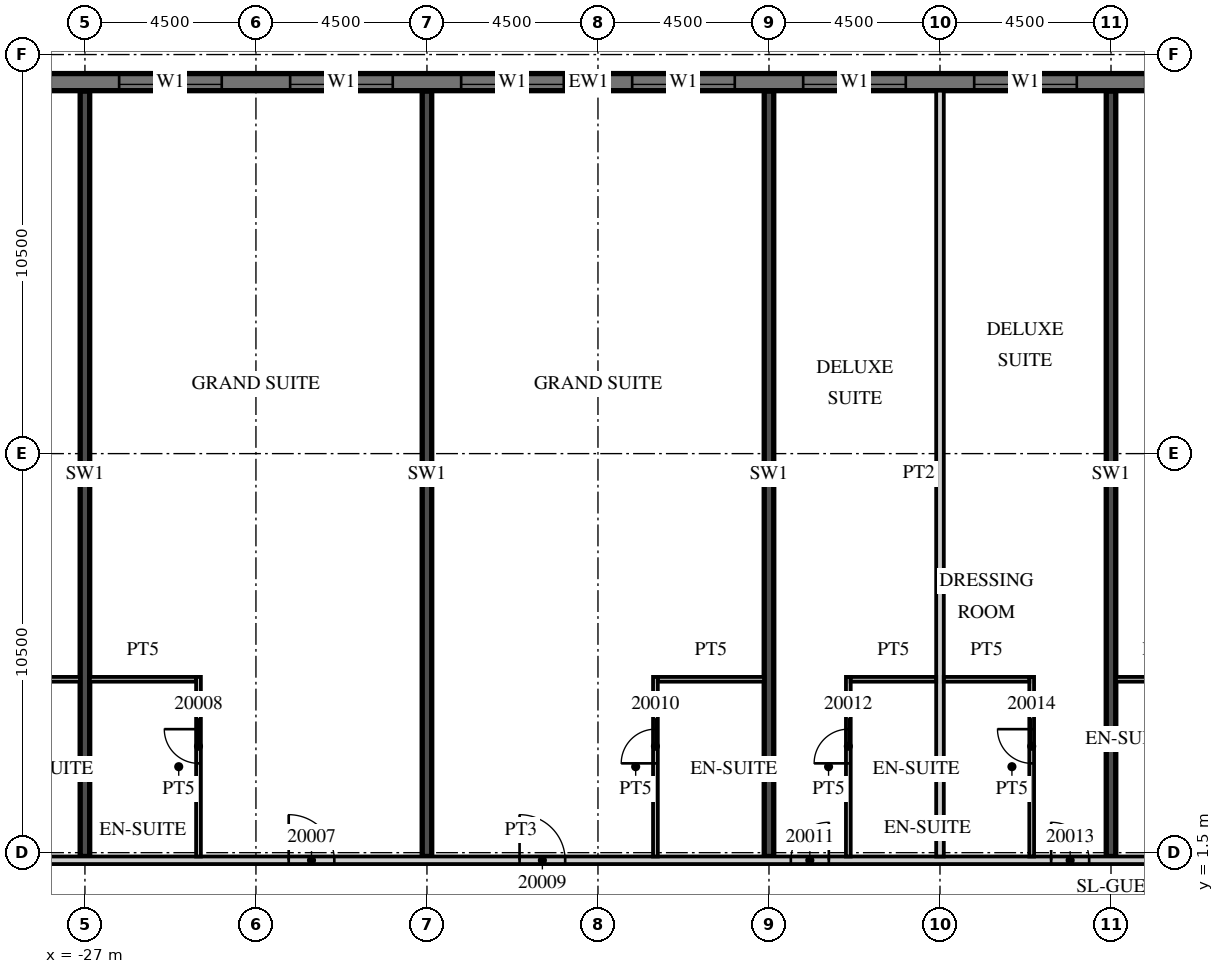
"""IFC4 building model, lengths in metres.
Left out: names, types, materials, properties, quantities, classifications, styles, units other than length and angle.
Written with IfcOpenShell. Run it as: python <this file> out.ifc"""

import sys

from ifc_helpers import new_model, si_unit, direction, frame, frame_2d, origin, place, context, subcontext, project, spatial, rectangle, extrude, element, fill, save


model = new_model("IFC4")
c1 = context("Model", 3, precision=1e-05, world=origin(), true_north=direction((0.0, 1.0)))
c2 = subcontext(c1, "Body", "Model", "MODEL_VIEW")
j1 = project(units=[si_unit("LENGTHUNIT", "METRE"), si_unit("PLANEANGLEUNIT", "RADIAN")], contexts=[c1])
p1 = place(None, origin())
s1 = spatial("IfcSite", under=j1, at=p1, CompositionType="ELEMENT")
p2 = place(p1, origin())
s2 = spatial("IfcBuilding", under=s1, at=p2, CompositionType="ELEMENT")
p3 = place(p2, frame((0.0, 0.0, 96.3)))
s3 = spatial("IfcBuildingStorey", under=s2, at=p3, CompositionType="ELEMENT", Elevation=96.3)
for number, where, z_axis, x_axis in (
    (1, (-27.0, 1.4, 0.0), (0.0, 0.0, 1.0), (0.0, 1.0, 0.0)),
    (2, (-18.0, 1.4, 0.0), (0.0, 0.0, 1.0), (0.0, 1.0, 0.0)),
    (3, (-9.0, 1.4, 0.0), (0.0, 0.0, 1.0), (0.0, 1.0, 0.0)),
    (4, (0.0, 1.4, 0.0), (0.0, 0.0, 1.0), (0.0, 1.0, 0.0)),
):
    element("IfcWall", number, at=place(p3, frame(where, z_axis=z_axis, x_axis=x_axis)), inside=s3, PredefinedType="SHEAR", context=c2, shape_type="SweptSolid", body=[
        extrude(rectangle(XDim=20.14, YDim=0.25, at=frame_2d((10.07, 0.0))), origin(), (0.0, 0.0, 1.0), 3.0),
    ])
p4 = place(p3, frame((13.5, 21.775, 0.0), z_axis=(0.0, 0.0, 1.0), x_axis=(-1.0, 0.0, 0.0)))
e5 = element("IfcWall", 5, at=p4, inside=s3, PredefinedType="SOLIDWALL", context=c2, shape_type="SweptSolid", body=[
    extrude(rectangle(XDim=54.5, YDim=0.45, at=frame_2d((27.25, 0.0))), origin(), (0.0, 0.0, 1.0), 3.0),
])
p5 = place(p4, frame((0.9, 0.0, 0.45)))
e6 = element("IfcOpeningElement", 6, at=p5, cuts=e5, PredefinedType="OPENING", context=c2, shape_type="SweptSolid", body=[
    extrude(rectangle(XDim=2.7, YDim=2.25, at=frame_2d((1.35, 1.125))), frame((0.0, 0.235, 0.0), z_axis=(0.0, -1.0, 0.0), x_axis=(1.0, 0.0, 0.0)), (0.0, 0.0, 1.0), 0.47),
])
p6 = place(p4, frame((5.4, 0.0, 0.45)))
e7 = element("IfcOpeningElement", 7, at=p6, cuts=e5, PredefinedType="OPENING", context=c2, shape_type="SweptSolid", body=[
    extrude(rectangle(XDim=2.7, YDim=2.25, at=frame_2d((1.35, 1.125))), frame((0.0, 0.235, 0.0), z_axis=(0.0, -1.0, 0.0), x_axis=(1.0, 0.0, 0.0)), (0.0, 0.0, 1.0), 0.47),
])
p7 = place(p4, frame((9.9, 0.0, 0.45)))
e8 = element("IfcOpeningElement", 8, at=p7, cuts=e5, PredefinedType="OPENING", context=c2, shape_type="SweptSolid", body=[
    extrude(rectangle(XDim=2.7, YDim=2.25, at=frame_2d((1.35, 1.125))), frame((0.0, 0.235, 0.0), z_axis=(0.0, -1.0, 0.0), x_axis=(1.0, 0.0, 0.0)), (0.0, 0.0, 1.0), 0.47),
])
p8 = place(p4, frame((14.4, 0.0, 0.45)))
e9 = element("IfcOpeningElement", 9, at=p8, cuts=e5, PredefinedType="OPENING", context=c2, shape_type="SweptSolid", body=[
    extrude(rectangle(XDim=2.7, YDim=2.25, at=frame_2d((1.35, 1.125))), frame((0.0, 0.235, 0.0), z_axis=(0.0, -1.0, 0.0), x_axis=(1.0, 0.0, 0.0)), (0.0, 0.0, 1.0), 0.47),
])
p9 = place(p4, frame((18.9, 0.0, 0.45)))
e10 = element("IfcOpeningElement", 10, at=p9, cuts=e5, PredefinedType="OPENING", context=c2, shape_type="SweptSolid", body=[
    extrude(rectangle(XDim=2.7, YDim=2.25, at=frame_2d((1.35, 1.125))), frame((0.0, 0.235, 0.0), z_axis=(0.0, -1.0, 0.0), x_axis=(1.0, 0.0, 0.0)), (0.0, 0.0, 1.0), 0.47),
])
p10 = place(p4, frame((23.4, 0.0, 0.45)))
e11 = element("IfcOpeningElement", 11, at=p10, cuts=e5, PredefinedType="OPENING", context=c2, shape_type="SweptSolid", body=[
    extrude(rectangle(XDim=2.7, YDim=2.25, at=frame_2d((1.35, 1.125))), frame((0.0, 0.235, 0.0), z_axis=(0.0, -1.0, 0.0), x_axis=(1.0, 0.0, 0.0)), (0.0, 0.0, 1.0), 0.47),
])
p11 = place(p4, frame((27.9, 0.0, 0.45)))
e12 = element("IfcOpeningElement", 12, at=p11, cuts=e5, PredefinedType="OPENING", context=c2, shape_type="SweptSolid", body=[
    extrude(rectangle(XDim=2.7, YDim=2.25, at=frame_2d((1.35, 1.125))), frame((0.0, 0.235, 0.0), z_axis=(0.0, -1.0, 0.0), x_axis=(1.0, 0.0, 0.0)), (0.0, 0.0, 1.0), 0.47),
])
p12 = place(p4, frame((32.4, 0.0, 0.45)))
e13 = element("IfcOpeningElement", 13, at=p12, cuts=e5, PredefinedType="OPENING", context=c2, shape_type="SweptSolid", body=[
    extrude(rectangle(XDim=2.7, YDim=2.25, at=frame_2d((1.35, 1.125))), frame((0.0, 0.235, 0.0), z_axis=(0.0, -1.0, 0.0), x_axis=(1.0, 0.0, 0.0)), (0.0, 0.0, 1.0), 0.47),
])
p13 = place(p4, frame((36.9, 0.0, 0.45)))
e14 = element("IfcOpeningElement", 14, at=p13, cuts=e5, PredefinedType="OPENING", context=c2, shape_type="SweptSolid", body=[
    extrude(rectangle(XDim=2.7, YDim=2.25, at=frame_2d((1.35, 1.125))), frame((0.0, 0.235, 0.0), z_axis=(0.0, -1.0, 0.0), x_axis=(1.0, 0.0, 0.0)), (0.0, 0.0, 1.0), 0.47),
])
p14 = place(p4, frame((41.4, 0.0, 0.45)))
e15 = element("IfcOpeningElement", 15, at=p14, cuts=e5, PredefinedType="OPENING", context=c2, shape_type="SweptSolid", body=[
    extrude(rectangle(XDim=2.7, YDim=2.25, at=frame_2d((1.35, 1.125))), frame((0.0, 0.235, 0.0), z_axis=(0.0, -1.0, 0.0), x_axis=(1.0, 0.0, 0.0)), (0.0, 0.0, 1.0), 0.47),
])
p15 = place(p4, frame((45.9, 0.0, 0.45)))
e16 = element("IfcOpeningElement", 16, at=p15, cuts=e5, PredefinedType="OPENING", context=c2, shape_type="SweptSolid", body=[
    extrude(rectangle(XDim=2.7, YDim=2.25, at=frame_2d((1.35, 1.125))), frame((0.0, 0.235, 0.0), z_axis=(0.0, -1.0, 0.0), x_axis=(1.0, 0.0, 0.0)), (0.0, 0.0, 1.0), 0.47),
])
p16 = place(p4, frame((50.4, 0.0, 0.45)))
e17 = element("IfcOpeningElement", 17, at=p16, cuts=e5, PredefinedType="OPENING", context=c2, shape_type="SweptSolid", body=[
    extrude(rectangle(XDim=2.7, YDim=2.25, at=frame_2d((1.35, 1.125))), frame((0.0, 0.235, 0.0), z_axis=(0.0, -1.0, 0.0), x_axis=(1.0, 0.0, 0.0)), (0.0, 0.0, 1.0), 0.47),
])
p17 = place(p3, frame((-44.55, 1.3, 0.0), z_axis=(0.0, 0.0, 1.0), x_axis=(1.0, 0.0, 0.0)))
e18 = element("IfcWall", 18, at=p17, inside=s3, PredefinedType="PARTITIONING", context=c2, shape_type="SweptSolid", body=[
    extrude(rectangle(XDim=58.05, YDim=0.2, at=frame_2d((29.025, 0.0))), origin(), (0.0, 0.0, 1.0), 3.0),
])
p18 = place(p17, frame((0.525, 0.0, 0.0)))
e19 = element("IfcOpeningElement", 19, at=p18, cuts=e18, PredefinedType="OPENING", context=c2, shape_type="SweptSolid", body=[
    extrude(rectangle(XDim=1.0, YDim=2.1, at=frame_2d((0.5, 1.05))), frame((0.0, 0.11, 0.0), z_axis=(0.0, -1.0, 0.0), x_axis=(1.0, 0.0, 0.0)), (0.0, 0.0, 1.0), 0.22),
])
p19 = place(p17, frame((4.625, 0.0, 0.0)))
e20 = element("IfcOpeningElement", 20, at=p19, cuts=e18, PredefinedType="OPENING", context=c2, shape_type="SweptSolid", body=[
    extrude(rectangle(XDim=1.0, YDim=2.1, at=frame_2d((0.5, 1.05))), frame((0.0, 0.11, 0.0), z_axis=(0.0, -1.0, 0.0), x_axis=(1.0, 0.0, 0.0)), (0.0, 0.0, 1.0), 0.22),
])
p20 = place(p17, frame((10.987, 0.0, 0.0)))
e21 = element("IfcOpeningElement", 21, at=p20, cuts=e18, PredefinedType="OPENING", context=c2, shape_type="SweptSolid", body=[
    extrude(rectangle(XDim=1.2, YDim=2.1, at=frame_2d((0.6, 1.05))), frame((0.0, 0.11, 0.0), z_axis=(0.0, -1.0, 0.0), x_axis=(1.0, 0.0, 0.0)), (0.0, 0.0, 1.0), 0.22),
])
p21 = place(p17, frame((22.912, 0.0, 0.0)))
e22 = element("IfcOpeningElement", 22, at=p21, cuts=e18, PredefinedType="OPENING", context=c2, shape_type="SweptSolid", body=[
    extrude(rectangle(XDim=1.2, YDim=2.1, at=frame_2d((0.6, 1.05))), frame((0.0, 0.11, 0.0), z_axis=(0.0, -1.0, 0.0), x_axis=(1.0, 0.0, 0.0)), (0.0, 0.0, 1.0), 0.22),
])
p22 = place(p17, frame((28.987, 0.0, 0.0)))
e23 = element("IfcOpeningElement", 23, at=p22, cuts=e18, PredefinedType="OPENING", context=c2, shape_type="SweptSolid", body=[
    extrude(rectangle(XDim=1.2, YDim=2.1, at=frame_2d((0.6, 1.05))), frame((0.0, 0.11, 0.0), z_axis=(0.0, -1.0, 0.0), x_axis=(1.0, 0.0, 0.0)), (0.0, 0.0, 1.0), 0.22),
])
p23 = place(p17, frame((36.125, 0.0, 0.0)))
e24 = element("IfcOpeningElement", 24, at=p23, cuts=e18, PredefinedType="OPENING", context=c2, shape_type="SweptSolid", body=[
    extrude(rectangle(XDim=1.0, YDim=2.1, at=frame_2d((0.5, 1.05))), frame((0.0, 0.11, 0.0), z_axis=(0.0, -1.0, 0.0), x_axis=(1.0, 0.0, 0.0)), (0.0, 0.0, 1.0), 0.22),
])
p24 = place(p17, frame((42.975, 0.0, 0.0)))
e25 = element("IfcOpeningElement", 25, at=p24, cuts=e18, PredefinedType="OPENING", context=c2, shape_type="SweptSolid", body=[
    extrude(rectangle(XDim=1.0, YDim=2.1, at=frame_2d((0.5, 1.05))), frame((0.0, 0.11, 0.0), z_axis=(0.0, -1.0, 0.0), x_axis=(1.0, 0.0, 0.0)), (0.0, 0.0, 1.0), 0.22),
])
p25 = place(p17, frame((47.5, 0.0, 0.0)))
e26 = element("IfcOpeningElement", 26, at=p25, cuts=e18, PredefinedType="OPENING", context=c2, shape_type="SweptSolid", body=[
    extrude(rectangle(XDim=1.0, YDim=2.1, at=frame_2d((0.5, 1.05))), frame((0.0, 0.11, 0.0), z_axis=(0.0, -1.0, 0.0), x_axis=(1.0, 0.0, 0.0)), (0.0, 0.0, 1.0), 0.22),
])
p26 = place(p17, frame((49.6, 0.0, 0.0)))
e27 = element("IfcOpeningElement", 27, at=p26, cuts=e18, PredefinedType="OPENING", context=c2, shape_type="SweptSolid", body=[
    extrude(rectangle(XDim=1.0, YDim=2.1, at=frame_2d((0.5, 1.05))), frame((0.0, 0.11, 0.0), z_axis=(0.0, -1.0, 0.0), x_axis=(1.0, 0.0, 0.0)), (0.0, 0.0, 1.0), 0.22),
])
p27 = place(p17, frame((56.475, 0.0, 0.0)))
e28 = element("IfcOpeningElement", 28, at=p27, cuts=e18, PredefinedType="OPENING", context=c2, shape_type="SweptSolid", body=[
    extrude(rectangle(XDim=1.0, YDim=2.1, at=frame_2d((0.5, 1.05))), frame((0.0, 0.11, 0.0), z_axis=(0.0, -1.0, 0.0), x_axis=(1.0, 0.0, 0.0)), (0.0, 0.0, 1.0), 0.22),
])
p28 = place(p3, frame((-29.925, 6.062, 0.0), z_axis=(0.0, 0.0, 1.0), x_axis=(1.0, 0.0, 0.0)))
e29 = element("IfcWall", 29, at=p28, inside=s3, PredefinedType="PARTITIONING", context=c2, shape_type="SweptSolid", body=[
    extrude(rectangle(XDim=2.8, YDim=0.125, at=frame_2d((1.4, 0.0))), origin(), (0.0, 0.0, 1.0), 3.0),
])
p29 = place(p3, frame((-24.012, 1.4, 0.0), z_axis=(0.0, 0.0, 1.0), x_axis=(0.0, 1.0, 0.0)))
e30 = element("IfcWall", 30, at=p29, inside=s3, PredefinedType="PARTITIONING", context=c2, shape_type="SweptSolid", body=[
    extrude(rectangle(XDim=4.725, YDim=0.125, at=frame_2d((2.363, 0.0))), origin(), (0.0, 0.0, 1.0), 3.0),
])
p30 = place(p29, frame((2.45, 0.0, 0.0)))
e31 = element("IfcOpeningElement", 31, at=p30, cuts=e30, PredefinedType="OPENING", context=c2, shape_type="SweptSolid", body=[
    extrude(rectangle(XDim=0.9, YDim=2.1, at=frame_2d((0.45, 1.05))), frame((0.0, 0.073, 0.0), z_axis=(0.0, -1.0, 0.0), x_axis=(1.0, 0.0, 0.0)), (0.0, 0.0, 1.0), 0.145),
])
p31 = place(p3, frame((-26.875, 6.062, 0.0), z_axis=(0.0, 0.0, 1.0), x_axis=(1.0, 0.0, 0.0)))
e32 = element("IfcWall", 32, at=p31, inside=s3, PredefinedType="PARTITIONING", context=c2, shape_type="SweptSolid", body=[
    extrude(rectangle(XDim=2.8, YDim=0.125, at=frame_2d((1.4, 0.0))), origin(), (0.0, 0.0, 1.0), 3.0),
])
p32 = place(p3, frame((-11.988, 1.4, 0.0), z_axis=(0.0, 0.0, 1.0), x_axis=(0.0, 1.0, 0.0)))
e33 = element("IfcWall", 33, at=p32, inside=s3, PredefinedType="PARTITIONING", context=c2, shape_type="SweptSolid", body=[
    extrude(rectangle(XDim=4.725, YDim=0.125, at=frame_2d((2.363, 0.0))), origin(), (0.0, 0.0, 1.0), 3.0),
])
p33 = place(p32, frame((2.45, 0.0, 0.0)))
e34 = element("IfcOpeningElement", 34, at=p33, cuts=e33, PredefinedType="OPENING", context=c2, shape_type="SweptSolid", body=[
    extrude(rectangle(XDim=0.9, YDim=2.1, at=frame_2d((0.45, 1.05))), frame((0.0, 0.073, 0.0), z_axis=(0.0, -1.0, 0.0), x_axis=(1.0, 0.0, 0.0)), (0.0, 0.0, 1.0), 0.145),
])
p34 = place(p3, frame((-11.925, 6.062, 0.0), z_axis=(0.0, 0.0, 1.0), x_axis=(1.0, 0.0, 0.0)))
e35 = element("IfcWall", 35, at=p34, inside=s3, PredefinedType="PARTITIONING", context=c2, shape_type="SweptSolid", body=[
    extrude(rectangle(XDim=2.8, YDim=0.125, at=frame_2d((1.4, 0.0))), origin(), (0.0, 0.0, 1.0), 3.0),
])
p35 = place(p3, frame((-4.5, 1.4, 0.0), z_axis=(0.0, 0.0, 1.0), x_axis=(0.0, 1.0, 0.0)))
e36 = element("IfcWall", 36, at=p35, inside=s3, PredefinedType="PARTITIONING", context=c2, shape_type="SweptSolid", body=[
    extrude(rectangle(XDim=20.15, YDim=0.2, at=frame_2d((10.075, 0.0))), origin(), (0.0, 0.0, 1.0), 3.0),
])
p36 = place(p3, frame((-6.912, 1.4, 0.0), z_axis=(0.0, 0.0, 1.0), x_axis=(0.0, 1.0, 0.0)))
e37 = element("IfcWall", 37, at=p36, inside=s3, PredefinedType="PARTITIONING", context=c2, shape_type="SweptSolid", body=[
    extrude(rectangle(XDim=4.725, YDim=0.125, at=frame_2d((2.363, 0.0))), origin(), (0.0, 0.0, 1.0), 3.0),
])
p37 = place(p36, frame((2.45, 0.0, 0.0)))
e38 = element("IfcOpeningElement", 38, at=p37, cuts=e37, PredefinedType="OPENING", context=c2, shape_type="SweptSolid", body=[
    extrude(rectangle(XDim=0.9, YDim=2.1, at=frame_2d((0.45, 1.05))), frame((0.0, 0.073, 0.0), z_axis=(0.0, -1.0, 0.0), x_axis=(1.0, 0.0, 0.0)), (0.0, 0.0, 1.0), 0.145),
])
p38 = place(p3, frame((-6.85, 6.062, 0.0), z_axis=(0.0, 0.0, 1.0), x_axis=(1.0, 0.0, 0.0)))
e39 = element("IfcWall", 39, at=p38, inside=s3, PredefinedType="PARTITIONING", context=c2, shape_type="SweptSolid", body=[
    extrude(rectangle(XDim=2.25, YDim=0.125, at=frame_2d((1.125, 0.0))), origin(), (0.0, 0.0, 1.0), 3.0),
])
p39 = place(p3, frame((-2.087, 1.4, 0.0), z_axis=(0.0, 0.0, 1.0), x_axis=(0.0, 1.0, 0.0)))
e40 = element("IfcWall", 40, at=p39, inside=s3, PredefinedType="PARTITIONING", context=c2, shape_type="SweptSolid", body=[
    extrude(rectangle(XDim=4.725, YDim=0.125, at=frame_2d((2.363, 0.0))), origin(), (0.0, 0.0, 1.0), 3.0),
])
p40 = place(p39, frame((2.45, 0.0, 0.0)))
e41 = element("IfcOpeningElement", 41, at=p40, cuts=e40, PredefinedType="OPENING", context=c2, shape_type="SweptSolid", body=[
    extrude(rectangle(XDim=0.9, YDim=2.1, at=frame_2d((0.45, 1.05))), frame((0.0, 0.073, 0.0), z_axis=(0.0, -1.0, 0.0), x_axis=(1.0, 0.0, 0.0)), (0.0, 0.0, 1.0), 0.145),
])
for number, where, z_axis, x_axis in (
    (42, (-4.4, 6.062, 0.0), (0.0, 0.0, 1.0), (1.0, 0.0, 0.0)),
    (43, (0.125, 6.062, 0.0), (0.0, 0.0, 1.0), (1.0, 0.0, 0.0)),
):
    element("IfcWall", number, at=place(p3, frame(where, z_axis=z_axis, x_axis=x_axis)), inside=s3, PredefinedType="PARTITIONING", context=c2, shape_type="SweptSolid", body=[
        extrude(rectangle(XDim=2.25, YDim=0.125, at=frame_2d((1.125, 0.0))), origin(), (0.0, 0.0, 1.0), 3.0),
    ])
p41 = place(p8, origin())
e44 = element("IfcWindow", 44, at=p41, inside=s3, PartitioningType="SINGLE_PANEL", PredefinedType="WINDOW", context=c2, shape_type="SweptSolid", body=[
    extrude(rectangle(XDim=2.7, YDim=2.25, at=frame_2d((1.35, 1.125))), frame((0.0, 0.09, 0.0), z_axis=(0.0, -1.0, 0.0), x_axis=(1.0, 0.0, 0.0)), (0.0, 0.0, 1.0), 0.06),
])
fill(e9, e44)
p42 = place(p9, origin())
e45 = element("IfcWindow", 45, at=p42, inside=s3, PartitioningType="SINGLE_PANEL", PredefinedType="WINDOW", context=c2, shape_type="SweptSolid", body=[
    extrude(rectangle(XDim=2.7, YDim=2.25, at=frame_2d((1.35, 1.125))), frame((0.0, 0.09, 0.0), z_axis=(0.0, -1.0, 0.0), x_axis=(1.0, 0.0, 0.0)), (0.0, 0.0, 1.0), 0.06),
])
fill(e10, e45)
p43 = place(p10, origin())
e46 = element("IfcWindow", 46, at=p43, inside=s3, PartitioningType="SINGLE_PANEL", PredefinedType="WINDOW", context=c2, shape_type="SweptSolid", body=[
    extrude(rectangle(XDim=2.7, YDim=2.25, at=frame_2d((1.35, 1.125))), frame((0.0, 0.09, 0.0), z_axis=(0.0, -1.0, 0.0), x_axis=(1.0, 0.0, 0.0)), (0.0, 0.0, 1.0), 0.06),
])
fill(e11, e46)
p44 = place(p11, origin())
e47 = element("IfcWindow", 47, at=p44, inside=s3, PartitioningType="SINGLE_PANEL", PredefinedType="WINDOW", context=c2, shape_type="SweptSolid", body=[
    extrude(rectangle(XDim=2.7, YDim=2.25, at=frame_2d((1.35, 1.125))), frame((0.0, 0.09, 0.0), z_axis=(0.0, -1.0, 0.0), x_axis=(1.0, 0.0, 0.0)), (0.0, 0.0, 1.0), 0.06),
])
fill(e12, e47)
p45 = place(p12, origin())
e48 = element("IfcWindow", 48, at=p45, inside=s3, PartitioningType="SINGLE_PANEL", PredefinedType="WINDOW", context=c2, shape_type="SweptSolid", body=[
    extrude(rectangle(XDim=2.7, YDim=2.25, at=frame_2d((1.35, 1.125))), frame((0.0, 0.09, 0.0), z_axis=(0.0, -1.0, 0.0), x_axis=(1.0, 0.0, 0.0)), (0.0, 0.0, 1.0), 0.06),
])
fill(e13, e48)
p46 = place(p13, origin())
e49 = element("IfcWindow", 49, at=p46, inside=s3, PartitioningType="SINGLE_PANEL", PredefinedType="WINDOW", context=c2, shape_type="SweptSolid", body=[
    extrude(rectangle(XDim=2.7, YDim=2.25, at=frame_2d((1.35, 1.125))), frame((0.0, 0.09, 0.0), z_axis=(0.0, -1.0, 0.0), x_axis=(1.0, 0.0, 0.0)), (0.0, 0.0, 1.0), 0.06),
])
fill(e14, e49)
p47 = place(p21, origin())
e50 = element("IfcDoor", 50, at=p47, inside=s3, OperationType="SINGLE_SWING_LEFT", PredefinedType="DOOR", context=c2, shape_type="SweptSolid", body=[
    extrude(rectangle(XDim=1.2, YDim=2.1, at=frame_2d((0.6, 1.05))), frame((0.0, 0.025, 0.0), z_axis=(0.0, -1.0, 0.0), x_axis=(1.0, 0.0, 0.0)), (0.0, 0.0, 1.0), 0.05),
])
fill(e22, e50)
p48 = place(p30, origin())
e51 = element("IfcDoor", 51, at=p48, inside=s3, OperationType="SINGLE_SWING_RIGHT", PredefinedType="DOOR", context=c2, shape_type="SweptSolid", body=[
    extrude(rectangle(XDim=0.9, YDim=2.1, at=frame_2d((0.45, 1.05))), frame((0.0, 0.025, 0.0), z_axis=(0.0, -1.0, 0.0), x_axis=(1.0, 0.0, 0.0)), (0.0, 0.0, 1.0), 0.05),
])
fill(e31, e51)
p49 = place(p22, origin())
e52 = element("IfcDoor", 52, at=p49, inside=s3, OperationType="SINGLE_SWING_LEFT", PredefinedType="DOOR", context=c2, shape_type="SweptSolid", body=[
    extrude(rectangle(XDim=1.2, YDim=2.1, at=frame_2d((0.6, 1.05))), frame((0.0, 0.025, 0.0), z_axis=(0.0, -1.0, 0.0), x_axis=(1.0, 0.0, 0.0)), (0.0, 0.0, 1.0), 0.05),
])
fill(e23, e52)
p50 = place(p33, origin())
e53 = element("IfcDoor", 53, at=p50, inside=s3, OperationType="SINGLE_SWING_LEFT", PredefinedType="DOOR", context=c2, shape_type="SweptSolid", body=[
    extrude(rectangle(XDim=0.9, YDim=2.1, at=frame_2d((0.45, 1.05))), frame((0.0, 0.025, 0.0), z_axis=(0.0, -1.0, 0.0), x_axis=(1.0, 0.0, 0.0)), (0.0, 0.0, 1.0), 0.05),
])
fill(e34, e53)
p51 = place(p23, origin())
e54 = element("IfcDoor", 54, at=p51, inside=s3, OperationType="SINGLE_SWING_RIGHT", PredefinedType="DOOR", context=c2, shape_type="SweptSolid", body=[
    extrude(rectangle(XDim=1.0, YDim=2.1, at=frame_2d((0.5, 1.05))), frame((0.0, 0.025, 0.0), z_axis=(0.0, -1.0, 0.0), x_axis=(1.0, 0.0, 0.0)), (0.0, 0.0, 1.0), 0.05),
])
fill(e24, e54)
p52 = place(p37, origin())
e55 = element("IfcDoor", 55, at=p52, inside=s3, OperationType="SINGLE_SWING_LEFT", PredefinedType="DOOR", context=c2, shape_type="SweptSolid", body=[
    extrude(rectangle(XDim=0.9, YDim=2.1, at=frame_2d((0.45, 1.05))), frame((0.0, 0.025, 0.0), z_axis=(0.0, -1.0, 0.0), x_axis=(1.0, 0.0, 0.0)), (0.0, 0.0, 1.0), 0.05),
])
fill(e38, e55)
p53 = place(p24, origin())
e56 = element("IfcDoor", 56, at=p53, inside=s3, OperationType="SINGLE_SWING_LEFT", PredefinedType="DOOR", context=c2, shape_type="SweptSolid", body=[
    extrude(rectangle(XDim=1.0, YDim=2.1, at=frame_2d((0.5, 1.05))), frame((0.0, 0.025, 0.0), z_axis=(0.0, -1.0, 0.0), x_axis=(1.0, 0.0, 0.0)), (0.0, 0.0, 1.0), 0.05),
])
fill(e25, e56)
p54 = place(p40, origin())
e57 = element("IfcDoor", 57, at=p54, inside=s3, OperationType="SINGLE_SWING_RIGHT", PredefinedType="DOOR", context=c2, shape_type="SweptSolid", body=[
    extrude(rectangle(XDim=0.9, YDim=2.1, at=frame_2d((0.45, 1.05))), frame((0.0, 0.025, 0.0), z_axis=(0.0, -1.0, 0.0), x_axis=(1.0, 0.0, 0.0)), (0.0, 0.0, 1.0), 0.05),
])
fill(e41, e57)
save(model, sys.argv[1])
